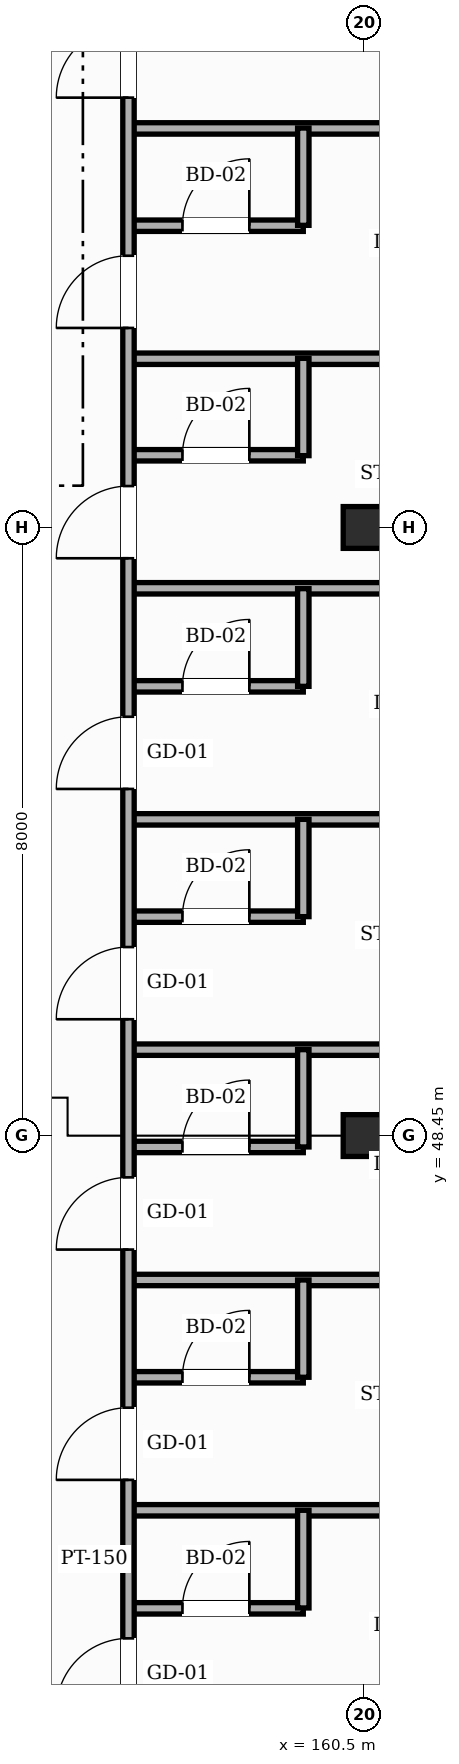
"""IFC4 building model, lengths in metres.
Left out: names, types, materials, properties, quantities, classifications, styles, units other than length and angle.
Written with IfcOpenShell. Run it as: python <this file> out.ifc"""

import sys

from ifc_helpers import new_model, si_unit, direction, frame, frame_2d, origin, origin_2d, place, context, subcontext, project, spatial, rectangle, hollow_rectangle, extrude, element, fill, save


model = new_model("IFC4")
c1 = context("Model", 3, precision=1e-05, world=origin(), true_north=direction((0.0, 1.0)))
c2 = subcontext(c1, "Body", "Model", "MODEL_VIEW")
j1 = project(units=[si_unit("LENGTHUNIT", "METRE"), si_unit("PLANEANGLEUNIT", "RADIAN")], contexts=[c1])
p1 = place(None, origin())
s1 = spatial("IfcSite", under=j1, at=p1, CompositionType="ELEMENT")
p2 = place(p1, origin())
s2 = spatial("IfcBuilding", under=s1, at=p2, CompositionType="ELEMENT")
p3 = place(p2, frame((0.0, 0.0, 31.8)))
s3 = spatial("IfcBuildingStorey", under=s2, at=p3, CompositionType="ELEMENT", Elevation=31.8)
for number, where, z_axis, x_axis in (
    (1, (160.5, 48.45, 0.0), (0.0, 0.0, 1.0), (1.0, 0.0, 0.0)),
    (2, (160.5, 56.45, 0.0), (0.0, 0.0, 1.0), (1.0, 0.0, 0.0)),
):
    element("IfcColumn", number, at=place(p3, frame(where, z_axis=z_axis, x_axis=x_axis)), inside=s3, PredefinedType="COLUMN", context=c2, shape_type="SweptSolid", body=[
        extrude(hollow_rectangle(XDim=0.55, YDim=0.55, WallThickness=0.022, InnerFilletRadius=0.022, OuterFilletRadius=0.044, at=origin_2d()), origin(), (0.0, 0.0, 1.0), 3.6),
    ])
p4 = place(p3, frame((157.4, 42.23, 0.0), z_axis=(0.0, 0.0, 1.0), x_axis=(1.0, 0.0, 0.0)))
e3 = element("IfcWall", 3, at=p4, inside=s3, PredefinedType="PARTITIONING", context=c2, shape_type="SweptSolid", body=[
    extrude(rectangle(XDim=2.3, YDim=0.15, at=frame_2d((1.15, 0.0))), origin(), (0.0, 0.0, 1.0), 3.365),
])
p5 = place(p4, frame((0.71, 0.0, 0.0)))
e4 = element("IfcOpeningElement", 4, at=p5, cuts=e3, PredefinedType="OPENING", context=c2, shape_type="SweptSolid", body=[
    extrude(rectangle(XDim=0.88, YDim=2.12, at=frame_2d((0.44, 1.06))), frame((0.0, 0.085, 0.0), z_axis=(0.0, -1.0, 0.0), x_axis=(1.0, 0.0, 0.0)), (0.0, 0.0, 1.0), 0.17),
])
p6 = place(p3, frame((157.4, 43.52, 0.0), z_axis=(0.0, 0.0, 1.0), x_axis=(1.0, 0.0, 0.0)))
e5 = element("IfcWall", 5, at=p6, inside=s3, PredefinedType="PARTITIONING", context=c2, shape_type="SweptSolid", body=[
    extrude(rectangle(XDim=9.8, YDim=0.15, at=frame_2d((4.9, 0.0))), origin(), (0.0, 0.0, 1.0), 3.365),
])
p7 = place(p3, frame((157.4, 45.27, 0.0), z_axis=(0.0, 0.0, 1.0), x_axis=(1.0, 0.0, 0.0)))
e6 = element("IfcWall", 6, at=p7, inside=s3, PredefinedType="PARTITIONING", context=c2, shape_type="SweptSolid", body=[
    extrude(rectangle(XDim=2.3, YDim=0.15, at=frame_2d((1.15, 0.0))), origin(), (0.0, 0.0, 1.0), 3.365),
])
p8 = place(p7, frame((0.71, 0.0, 0.0)))
e7 = element("IfcOpeningElement", 7, at=p8, cuts=e6, PredefinedType="OPENING", context=c2, shape_type="SweptSolid", body=[
    extrude(rectangle(XDim=0.88, YDim=2.12, at=frame_2d((0.44, 1.06))), frame((0.0, 0.085, 0.0), z_axis=(0.0, -1.0, 0.0), x_axis=(1.0, 0.0, 0.0)), (0.0, 0.0, 1.0), 0.17),
])
p9 = place(p3, frame((157.4, 46.55, 0.0), z_axis=(0.0, 0.0, 1.0), x_axis=(1.0, 0.0, 0.0)))
e8 = element("IfcWall", 8, at=p9, inside=s3, PredefinedType="PARTITIONING", context=c2, shape_type="SweptSolid", body=[
    extrude(rectangle(XDim=9.8, YDim=0.15, at=frame_2d((4.9, 0.0))), origin(), (0.0, 0.0, 1.0), 3.365),
])
p10 = place(p3, frame((157.4, 48.3, 0.0), z_axis=(0.0, 0.0, 1.0), x_axis=(1.0, 0.0, 0.0)))
e9 = element("IfcWall", 9, at=p10, inside=s3, PredefinedType="PARTITIONING", context=c2, shape_type="SweptSolid", body=[
    extrude(rectangle(XDim=2.3, YDim=0.15, at=frame_2d((1.15, 0.0))), origin(), (0.0, 0.0, 1.0), 3.365),
])
p11 = place(p10, frame((0.71, 0.0, 0.0)))
e10 = element("IfcOpeningElement", 10, at=p11, cuts=e9, PredefinedType="OPENING", context=c2, shape_type="SweptSolid", body=[
    extrude(rectangle(XDim=0.88, YDim=2.12, at=frame_2d((0.44, 1.06))), frame((0.0, 0.085, 0.0), z_axis=(0.0, -1.0, 0.0), x_axis=(1.0, 0.0, 0.0)), (0.0, 0.0, 1.0), 0.17),
])
p12 = place(p3, frame((157.4, 49.58, 0.0), z_axis=(0.0, 0.0, 1.0), x_axis=(1.0, 0.0, 0.0)))
e11 = element("IfcWall", 11, at=p12, inside=s3, PredefinedType="PARTITIONING", context=c2, shape_type="SweptSolid", body=[
    extrude(rectangle(XDim=9.8, YDim=0.15, at=frame_2d((4.9, 0.0))), origin(), (0.0, 0.0, 1.0), 3.365),
])
p13 = place(p3, frame((157.4, 51.33, 0.0), z_axis=(0.0, 0.0, 1.0), x_axis=(1.0, 0.0, 0.0)))
e12 = element("IfcWall", 12, at=p13, inside=s3, PredefinedType="PARTITIONING", context=c2, shape_type="SweptSolid", body=[
    extrude(rectangle(XDim=2.3, YDim=0.15, at=frame_2d((1.15, 0.0))), origin(), (0.0, 0.0, 1.0), 3.365),
])
p14 = place(p13, frame((0.71, 0.0, 0.0)))
e13 = element("IfcOpeningElement", 13, at=p14, cuts=e12, PredefinedType="OPENING", context=c2, shape_type="SweptSolid", body=[
    extrude(rectangle(XDim=0.88, YDim=2.12, at=frame_2d((0.44, 1.06))), frame((0.0, 0.085, 0.0), z_axis=(0.0, -1.0, 0.0), x_axis=(1.0, 0.0, 0.0)), (0.0, 0.0, 1.0), 0.17),
])
p15 = place(p3, frame((157.4, 52.61, 0.0), z_axis=(0.0, 0.0, 1.0), x_axis=(1.0, 0.0, 0.0)))
e14 = element("IfcWall", 14, at=p15, inside=s3, PredefinedType="PARTITIONING", context=c2, shape_type="SweptSolid", body=[
    extrude(rectangle(XDim=9.8, YDim=0.15, at=frame_2d((4.9, 0.0))), origin(), (0.0, 0.0, 1.0), 3.055),
])
p16 = place(p3, frame((157.4, 54.36, 0.0), z_axis=(0.0, 0.0, 1.0), x_axis=(1.0, 0.0, 0.0)))
e15 = element("IfcWall", 15, at=p16, inside=s3, PredefinedType="PARTITIONING", context=c2, shape_type="SweptSolid", body=[
    extrude(rectangle(XDim=2.3, YDim=0.15, at=frame_2d((1.15, 0.0))), origin(), (0.0, 0.0, 1.0), 3.365),
])
p17 = place(p16, frame((0.71, 0.0, 0.0)))
e16 = element("IfcOpeningElement", 16, at=p17, cuts=e15, PredefinedType="OPENING", context=c2, shape_type="SweptSolid", body=[
    extrude(rectangle(XDim=0.88, YDim=2.12, at=frame_2d((0.44, 1.06))), frame((0.0, 0.085, 0.0), z_axis=(0.0, -1.0, 0.0), x_axis=(1.0, 0.0, 0.0)), (0.0, 0.0, 1.0), 0.17),
])
p18 = place(p3, frame((157.4, 55.65, 0.0), z_axis=(0.0, 0.0, 1.0), x_axis=(1.0, 0.0, 0.0)))
e17 = element("IfcWall", 17, at=p18, inside=s3, PredefinedType="PARTITIONING", context=c2, shape_type="SweptSolid", body=[
    extrude(rectangle(XDim=9.8, YDim=0.15, at=frame_2d((4.9, 0.0))), origin(), (0.0, 0.0, 1.0), 3.365),
])
p19 = place(p3, frame((157.4, 57.4, 0.0), z_axis=(0.0, 0.0, 1.0), x_axis=(1.0, 0.0, 0.0)))
e18 = element("IfcWall", 18, at=p19, inside=s3, PredefinedType="PARTITIONING", context=c2, shape_type="SweptSolid", body=[
    extrude(rectangle(XDim=2.3, YDim=0.15, at=frame_2d((1.15, 0.0))), origin(), (0.0, 0.0, 1.0), 3.365),
])
p20 = place(p19, frame((0.71, 0.0, 0.0)))
e19 = element("IfcOpeningElement", 19, at=p20, cuts=e18, PredefinedType="OPENING", context=c2, shape_type="SweptSolid", body=[
    extrude(rectangle(XDim=0.88, YDim=2.12, at=frame_2d((0.44, 1.06))), frame((0.0, 0.085, 0.0), z_axis=(0.0, -1.0, 0.0), x_axis=(1.0, 0.0, 0.0)), (0.0, 0.0, 1.0), 0.17),
])
p21 = place(p3, frame((157.4, 58.67, 0.0), z_axis=(0.0, 0.0, 1.0), x_axis=(1.0, 0.0, 0.0)))
e20 = element("IfcWall", 20, at=p21, inside=s3, PredefinedType="PARTITIONING", context=c2, shape_type="SweptSolid", body=[
    extrude(rectangle(XDim=9.8, YDim=0.15, at=frame_2d((4.9, 0.0))), origin(), (0.0, 0.0, 1.0), 3.365),
])
p22 = place(p3, frame((157.4, 60.42, 0.0), z_axis=(0.0, 0.0, 1.0), x_axis=(1.0, 0.0, 0.0)))
e21 = element("IfcWall", 21, at=p22, inside=s3, PredefinedType="PARTITIONING", context=c2, shape_type="SweptSolid", body=[
    extrude(rectangle(XDim=2.3, YDim=0.15, at=frame_2d((1.15, 0.0))), origin(), (0.0, 0.0, 1.0), 3.365),
])
p23 = place(p22, frame((0.71, 0.0, 0.0)))
e22 = element("IfcOpeningElement", 22, at=p23, cuts=e21, PredefinedType="OPENING", context=c2, shape_type="SweptSolid", body=[
    extrude(rectangle(XDim=0.88, YDim=2.12, at=frame_2d((0.44, 1.06))), frame((0.0, 0.085, 0.0), z_axis=(0.0, -1.0, 0.0), x_axis=(1.0, 0.0, 0.0)), (0.0, 0.0, 1.0), 0.17),
])
p24 = place(p3, frame((157.4, 61.7, 0.0), z_axis=(0.0, 0.0, 1.0), x_axis=(1.0, 0.0, 0.0)))
e23 = element("IfcWall", 23, at=p24, inside=s3, PredefinedType="PARTITIONING", context=c2, shape_type="SweptSolid", body=[
    extrude(rectangle(XDim=9.8, YDim=0.15, at=frame_2d((4.9, 0.0))), origin(), (0.0, 0.0, 1.0), 3.365),
])
p25 = place(p3, frame((157.4, 22.3, 0.0), z_axis=(0.0, 0.0, 1.0), x_axis=(0.0, 1.0, 0.0)))
e24 = element("IfcWall", 24, at=p25, inside=s3, PredefinedType="PARTITIONING", context=c2, shape_type="SweptSolid", body=[
    extrude(rectangle(XDim=48.5, YDim=0.15, at=frame_2d((24.25, 0.0))), origin(), (0.0, 0.0, 1.0), 3.365),
])
p26 = place(p25, frame((0.4, 0.0, 0.0)))
e25 = element("IfcOpeningElement", 25, at=p26, cuts=e24, PredefinedType="OPENING", context=c2, shape_type="SweptSolid", body=[
    extrude(rectangle(XDim=0.95, YDim=2.15, at=frame_2d((0.475, 1.075))), frame((0.0, 0.085, 0.0), z_axis=(0.0, -1.0, 0.0), x_axis=(1.0, 0.0, 0.0)), (0.0, 0.0, 1.0), 0.17),
])
p27 = place(p25, frame((3.43, 0.0, 0.0)))
e26 = element("IfcOpeningElement", 26, at=p27, cuts=e24, PredefinedType="OPENING", context=c2, shape_type="SweptSolid", body=[
    extrude(rectangle(XDim=0.95, YDim=2.15, at=frame_2d((0.475, 1.075))), frame((0.0, 0.085, 0.0), z_axis=(0.0, -1.0, 0.0), x_axis=(1.0, 0.0, 0.0)), (0.0, 0.0, 1.0), 0.17),
])
p28 = place(p25, frame((6.46, 0.0, 0.0)))
e27 = element("IfcOpeningElement", 27, at=p28, cuts=e24, PredefinedType="OPENING", context=c2, shape_type="SweptSolid", body=[
    extrude(rectangle(XDim=0.95, YDim=2.15, at=frame_2d((0.475, 1.075))), frame((0.0, 0.085, 0.0), z_axis=(0.0, -1.0, 0.0), x_axis=(1.0, 0.0, 0.0)), (0.0, 0.0, 1.0), 0.17),
])
p29 = place(p25, frame((9.495, 0.0, 0.0)))
e28 = element("IfcOpeningElement", 28, at=p29, cuts=e24, PredefinedType="OPENING", context=c2, shape_type="SweptSolid", body=[
    extrude(rectangle(XDim=0.95, YDim=2.15, at=frame_2d((0.475, 1.075))), frame((0.0, 0.085, 0.0), z_axis=(0.0, -1.0, 0.0), x_axis=(1.0, 0.0, 0.0)), (0.0, 0.0, 1.0), 0.17),
])
p30 = place(p25, frame((12.525, 0.0, 0.0)))
e29 = element("IfcOpeningElement", 29, at=p30, cuts=e24, PredefinedType="OPENING", context=c2, shape_type="SweptSolid", body=[
    extrude(rectangle(XDim=0.95, YDim=2.15, at=frame_2d((0.475, 1.075))), frame((0.0, 0.085, 0.0), z_axis=(0.0, -1.0, 0.0), x_axis=(1.0, 0.0, 0.0)), (0.0, 0.0, 1.0), 0.17),
])
p31 = place(p25, frame((15.555, 0.0, 0.0)))
e30 = element("IfcOpeningElement", 30, at=p31, cuts=e24, PredefinedType="OPENING", context=c2, shape_type="SweptSolid", body=[
    extrude(rectangle(XDim=0.95, YDim=2.15, at=frame_2d((0.475, 1.075))), frame((0.0, 0.085, 0.0), z_axis=(0.0, -1.0, 0.0), x_axis=(1.0, 0.0, 0.0)), (0.0, 0.0, 1.0), 0.17),
])
p32 = place(p25, frame((18.585, 0.0, 0.0)))
e31 = element("IfcOpeningElement", 31, at=p32, cuts=e24, PredefinedType="OPENING", context=c2, shape_type="SweptSolid", body=[
    extrude(rectangle(XDim=0.95, YDim=2.15, at=frame_2d((0.475, 1.075))), frame((0.0, 0.085, 0.0), z_axis=(0.0, -1.0, 0.0), x_axis=(1.0, 0.0, 0.0)), (0.0, 0.0, 1.0), 0.17),
])
p33 = place(p25, frame((21.62, 0.0, 0.0)))
e32 = element("IfcOpeningElement", 32, at=p33, cuts=e24, PredefinedType="OPENING", context=c2, shape_type="SweptSolid", body=[
    extrude(rectangle(XDim=0.95, YDim=2.15, at=frame_2d((0.475, 1.075))), frame((0.0, 0.085, 0.0), z_axis=(0.0, -1.0, 0.0), x_axis=(1.0, 0.0, 0.0)), (0.0, 0.0, 1.0), 0.17),
])
p34 = place(p25, frame((24.65, 0.0, 0.0)))
e33 = element("IfcOpeningElement", 33, at=p34, cuts=e24, PredefinedType="OPENING", context=c2, shape_type="SweptSolid", body=[
    extrude(rectangle(XDim=0.95, YDim=2.15, at=frame_2d((0.475, 1.075))), frame((0.0, 0.085, 0.0), z_axis=(0.0, -1.0, 0.0), x_axis=(1.0, 0.0, 0.0)), (0.0, 0.0, 1.0), 0.17),
])
p35 = place(p25, frame((27.68, 0.0, 0.0)))
e34 = element("IfcOpeningElement", 34, at=p35, cuts=e24, PredefinedType="OPENING", context=c2, shape_type="SweptSolid", body=[
    extrude(rectangle(XDim=0.95, YDim=2.15, at=frame_2d((0.475, 1.075))), frame((0.0, 0.085, 0.0), z_axis=(0.0, -1.0, 0.0), x_axis=(1.0, 0.0, 0.0)), (0.0, 0.0, 1.0), 0.17),
])
p36 = place(p25, frame((30.71, 0.0, 0.0)))
e35 = element("IfcOpeningElement", 35, at=p36, cuts=e24, PredefinedType="OPENING", context=c2, shape_type="SweptSolid", body=[
    extrude(rectangle(XDim=0.95, YDim=2.15, at=frame_2d((0.475, 1.075))), frame((0.0, 0.085, 0.0), z_axis=(0.0, -1.0, 0.0), x_axis=(1.0, 0.0, 0.0)), (0.0, 0.0, 1.0), 0.17),
])
p37 = place(p25, frame((33.745, 0.0, 0.0)))
e36 = element("IfcOpeningElement", 36, at=p37, cuts=e24, PredefinedType="OPENING", context=c2, shape_type="SweptSolid", body=[
    extrude(rectangle(XDim=0.95, YDim=2.15, at=frame_2d((0.475, 1.075))), frame((0.0, 0.085, 0.0), z_axis=(0.0, -1.0, 0.0), x_axis=(1.0, 0.0, 0.0)), (0.0, 0.0, 1.0), 0.17),
])
p38 = place(p25, frame((36.775, 0.0, 0.0)))
e37 = element("IfcOpeningElement", 37, at=p38, cuts=e24, PredefinedType="OPENING", context=c2, shape_type="SweptSolid", body=[
    extrude(rectangle(XDim=0.95, YDim=2.15, at=frame_2d((0.475, 1.075))), frame((0.0, 0.085, 0.0), z_axis=(0.0, -1.0, 0.0), x_axis=(1.0, 0.0, 0.0)), (0.0, 0.0, 1.0), 0.17),
])
p39 = place(p25, frame((39.805, 0.0, 0.0)))
e38 = element("IfcOpeningElement", 38, at=p39, cuts=e24, PredefinedType="OPENING", context=c2, shape_type="SweptSolid", body=[
    extrude(rectangle(XDim=0.95, YDim=2.15, at=frame_2d((0.475, 1.075))), frame((0.0, 0.085, 0.0), z_axis=(0.0, -1.0, 0.0), x_axis=(1.0, 0.0, 0.0)), (0.0, 0.0, 1.0), 0.17),
])
p40 = place(p25, frame((42.84, 0.0, 0.0)))
e39 = element("IfcOpeningElement", 39, at=p40, cuts=e24, PredefinedType="OPENING", context=c2, shape_type="SweptSolid", body=[
    extrude(rectangle(XDim=0.95, YDim=2.15, at=frame_2d((0.475, 1.075))), frame((0.0, 0.085, 0.0), z_axis=(0.0, -1.0, 0.0), x_axis=(1.0, 0.0, 0.0)), (0.0, 0.0, 1.0), 0.17),
])
p41 = place(p25, frame((45.87, 0.0, 0.0)))
e40 = element("IfcOpeningElement", 40, at=p41, cuts=e24, PredefinedType="OPENING", context=c2, shape_type="SweptSolid", body=[
    extrude(rectangle(XDim=0.95, YDim=2.15, at=frame_2d((0.475, 1.075))), frame((0.0, 0.085, 0.0), z_axis=(0.0, -1.0, 0.0), x_axis=(1.0, 0.0, 0.0)), (0.0, 0.0, 1.0), 0.17),
])
p42 = place(p3, frame((159.7, 42.235, 0.0), z_axis=(0.0, 0.0, 1.0), x_axis=(0.0, 1.0, 0.0)))
e41 = element("IfcWall", 41, at=p42, inside=s3, PredefinedType="PARTITIONING", context=c2, shape_type="SweptSolid", body=[
    extrude(rectangle(XDim=1.285, YDim=0.15, at=frame_2d((0.643, 0.0))), origin(), (0.0, 0.0, 1.0), 3.365),
])
for number, where, z_axis, x_axis in (
    (42, (159.7, 45.27, 0.0), (0.0, 0.0, 1.0), (0.0, 1.0, 0.0)),
    (43, (159.7, 48.3, 0.0), (0.0, 0.0, 1.0), (0.0, 1.0, 0.0)),
    (44, (159.7, 51.33, 0.0), (0.0, 0.0, 1.0), (0.0, 1.0, 0.0)),
):
    element("IfcWall", number, at=place(p3, frame(where, z_axis=z_axis, x_axis=x_axis)), inside=s3, PredefinedType="PARTITIONING", context=c2, shape_type="SweptSolid", body=[
        extrude(rectangle(XDim=1.28, YDim=0.15, at=frame_2d((0.64, 0.0))), origin(), (0.0, 0.0, 1.0), 3.365),
    ])
p43 = place(p3, frame((159.7, 54.36, 0.0), z_axis=(0.0, 0.0, 1.0), x_axis=(0.0, 1.0, 0.0)))
e45 = element("IfcWall", 45, at=p43, inside=s3, PredefinedType="PARTITIONING", context=c2, shape_type="SweptSolid", body=[
    extrude(rectangle(XDim=1.285, YDim=0.15, at=frame_2d((0.643, 0.0))), origin(), (0.0, 0.0, 1.0), 3.365),
])
for number, where, z_axis, x_axis in (
    (46, (159.7, 57.395, 0.0), (0.0, 0.0, 1.0), (0.0, 1.0, 0.0)),
    (47, (159.7, 60.425, 0.0), (0.0, 0.0, 1.0), (0.0, 1.0, 0.0)),
):
    element("IfcWall", number, at=place(p3, frame(where, z_axis=z_axis, x_axis=x_axis)), inside=s3, PredefinedType="PARTITIONING", context=c2, shape_type="SweptSolid", body=[
        extrude(rectangle(XDim=1.28, YDim=0.15, at=frame_2d((0.64, 0.0))), origin(), (0.0, 0.0, 1.0), 3.365),
    ])
p44 = place(p32, origin())
e48 = element("IfcDoor", 48, at=p44, inside=s3, OperationType="SINGLE_SWING_LEFT", PredefinedType="DOOR", context=c2, shape_type="SweptSolid", body=[
    extrude(rectangle(XDim=0.95, YDim=2.15, at=frame_2d((0.475, 1.075))), frame((0.0, 0.025, 0.0), z_axis=(0.0, -1.0, 0.0), x_axis=(1.0, 0.0, 0.0)), (0.0, 0.0, 1.0), 0.05),
])
fill(e31, e48)
p45 = place(p5, origin())
e49 = element("IfcDoor", 49, at=p45, inside=s3, OperationType="SINGLE_SWING_RIGHT", PredefinedType="DOOR", context=c2, shape_type="SweptSolid", body=[
    extrude(rectangle(XDim=0.88, YDim=2.12, at=frame_2d((0.44, 1.06))), frame((0.0, 0.025, 0.0), z_axis=(0.0, -1.0, 0.0), x_axis=(1.0, 0.0, 0.0)), (0.0, 0.0, 1.0), 0.05),
])
fill(e4, e49)
p46 = place(p33, origin())
e50 = element("IfcDoor", 50, at=p46, inside=s3, OperationType="SINGLE_SWING_LEFT", PredefinedType="DOOR", context=c2, shape_type="SweptSolid", body=[
    extrude(rectangle(XDim=0.95, YDim=2.15, at=frame_2d((0.475, 1.075))), frame((0.0, 0.025, 0.0), z_axis=(0.0, -1.0, 0.0), x_axis=(1.0, 0.0, 0.0)), (0.0, 0.0, 1.0), 0.05),
])
fill(e32, e50)
p47 = place(p8, origin())
e51 = element("IfcDoor", 51, at=p47, inside=s3, OperationType="SINGLE_SWING_RIGHT", PredefinedType="DOOR", context=c2, shape_type="SweptSolid", body=[
    extrude(rectangle(XDim=0.88, YDim=2.12, at=frame_2d((0.44, 1.06))), frame((0.0, 0.025, 0.0), z_axis=(0.0, -1.0, 0.0), x_axis=(1.0, 0.0, 0.0)), (0.0, 0.0, 1.0), 0.05),
])
fill(e7, e51)
p48 = place(p34, origin())
e52 = element("IfcDoor", 52, at=p48, inside=s3, OperationType="SINGLE_SWING_LEFT", PredefinedType="DOOR", context=c2, shape_type="SweptSolid", body=[
    extrude(rectangle(XDim=0.95, YDim=2.15, at=frame_2d((0.475, 1.075))), frame((0.0, 0.025, 0.0), z_axis=(0.0, -1.0, 0.0), x_axis=(1.0, 0.0, 0.0)), (0.0, 0.0, 1.0), 0.05),
])
fill(e33, e52)
p49 = place(p11, origin())
e53 = element("IfcDoor", 53, at=p49, inside=s3, OperationType="SINGLE_SWING_RIGHT", PredefinedType="DOOR", context=c2, shape_type="SweptSolid", body=[
    extrude(rectangle(XDim=0.88, YDim=2.12, at=frame_2d((0.44, 1.06))), frame((0.0, 0.025, 0.0), z_axis=(0.0, -1.0, 0.0), x_axis=(1.0, 0.0, 0.0)), (0.0, 0.0, 1.0), 0.05),
])
fill(e10, e53)
p50 = place(p35, origin())
e54 = element("IfcDoor", 54, at=p50, inside=s3, OperationType="SINGLE_SWING_LEFT", PredefinedType="DOOR", context=c2, shape_type="SweptSolid", body=[
    extrude(rectangle(XDim=0.95, YDim=2.15, at=frame_2d((0.475, 1.075))), frame((0.0, 0.025, 0.0), z_axis=(0.0, -1.0, 0.0), x_axis=(1.0, 0.0, 0.0)), (0.0, 0.0, 1.0), 0.05),
])
fill(e34, e54)
p51 = place(p14, origin())
e55 = element("IfcDoor", 55, at=p51, inside=s3, OperationType="SINGLE_SWING_RIGHT", PredefinedType="DOOR", context=c2, shape_type="SweptSolid", body=[
    extrude(rectangle(XDim=0.88, YDim=2.12, at=frame_2d((0.44, 1.06))), frame((0.0, 0.025, 0.0), z_axis=(0.0, -1.0, 0.0), x_axis=(1.0, 0.0, 0.0)), (0.0, 0.0, 1.0), 0.05),
])
fill(e13, e55)
p52 = place(p36, origin())
e56 = element("IfcDoor", 56, at=p52, inside=s3, OperationType="SINGLE_SWING_LEFT", PredefinedType="DOOR", context=c2, shape_type="SweptSolid", body=[
    extrude(rectangle(XDim=0.95, YDim=2.15, at=frame_2d((0.475, 1.075))), frame((0.0, 0.025, 0.0), z_axis=(0.0, -1.0, 0.0), x_axis=(1.0, 0.0, 0.0)), (0.0, 0.0, 1.0), 0.05),
])
fill(e35, e56)
p53 = place(p17, origin())
e57 = element("IfcDoor", 57, at=p53, inside=s3, OperationType="SINGLE_SWING_RIGHT", PredefinedType="DOOR", context=c2, shape_type="SweptSolid", body=[
    extrude(rectangle(XDim=0.88, YDim=2.12, at=frame_2d((0.44, 1.06))), frame((0.0, 0.025, 0.0), z_axis=(0.0, -1.0, 0.0), x_axis=(1.0, 0.0, 0.0)), (0.0, 0.0, 1.0), 0.05),
])
fill(e16, e57)
p54 = place(p37, origin())
e58 = element("IfcDoor", 58, at=p54, inside=s3, OperationType="SINGLE_SWING_LEFT", PredefinedType="DOOR", context=c2, shape_type="SweptSolid", body=[
    extrude(rectangle(XDim=0.95, YDim=2.15, at=frame_2d((0.475, 1.075))), frame((0.0, 0.025, 0.0), z_axis=(0.0, -1.0, 0.0), x_axis=(1.0, 0.0, 0.0)), (0.0, 0.0, 1.0), 0.05),
])
fill(e36, e58)
p55 = place(p20, origin())
e59 = element("IfcDoor", 59, at=p55, inside=s3, OperationType="SINGLE_SWING_RIGHT", PredefinedType="DOOR", context=c2, shape_type="SweptSolid", body=[
    extrude(rectangle(XDim=0.88, YDim=2.12, at=frame_2d((0.44, 1.06))), frame((0.0, 0.025, 0.0), z_axis=(0.0, -1.0, 0.0), x_axis=(1.0, 0.0, 0.0)), (0.0, 0.0, 1.0), 0.05),
])
fill(e19, e59)
p56 = place(p38, origin())
e60 = element("IfcDoor", 60, at=p56, inside=s3, OperationType="SINGLE_SWING_LEFT", PredefinedType="DOOR", context=c2, shape_type="SweptSolid", body=[
    extrude(rectangle(XDim=0.95, YDim=2.15, at=frame_2d((0.475, 1.075))), frame((0.0, 0.025, 0.0), z_axis=(0.0, -1.0, 0.0), x_axis=(1.0, 0.0, 0.0)), (0.0, 0.0, 1.0), 0.05),
])
fill(e37, e60)
p57 = place(p23, origin())
e61 = element("IfcDoor", 61, at=p57, inside=s3, OperationType="SINGLE_SWING_RIGHT", PredefinedType="DOOR", context=c2, shape_type="SweptSolid", body=[
    extrude(rectangle(XDim=0.88, YDim=2.12, at=frame_2d((0.44, 1.06))), frame((0.0, 0.025, 0.0), z_axis=(0.0, -1.0, 0.0), x_axis=(1.0, 0.0, 0.0)), (0.0, 0.0, 1.0), 0.05),
])
fill(e22, e61)
p58 = place(p39, origin())
e62 = element("IfcDoor", 62, at=p58, inside=s3, OperationType="SINGLE_SWING_LEFT", PredefinedType="DOOR", context=c2, shape_type="SweptSolid", body=[
    extrude(rectangle(XDim=0.95, YDim=2.15, at=frame_2d((0.475, 1.075))), frame((0.0, 0.025, 0.0), z_axis=(0.0, -1.0, 0.0), x_axis=(1.0, 0.0, 0.0)), (0.0, 0.0, 1.0), 0.05),
])
fill(e38, e62)
save(model, sys.argv[1])
